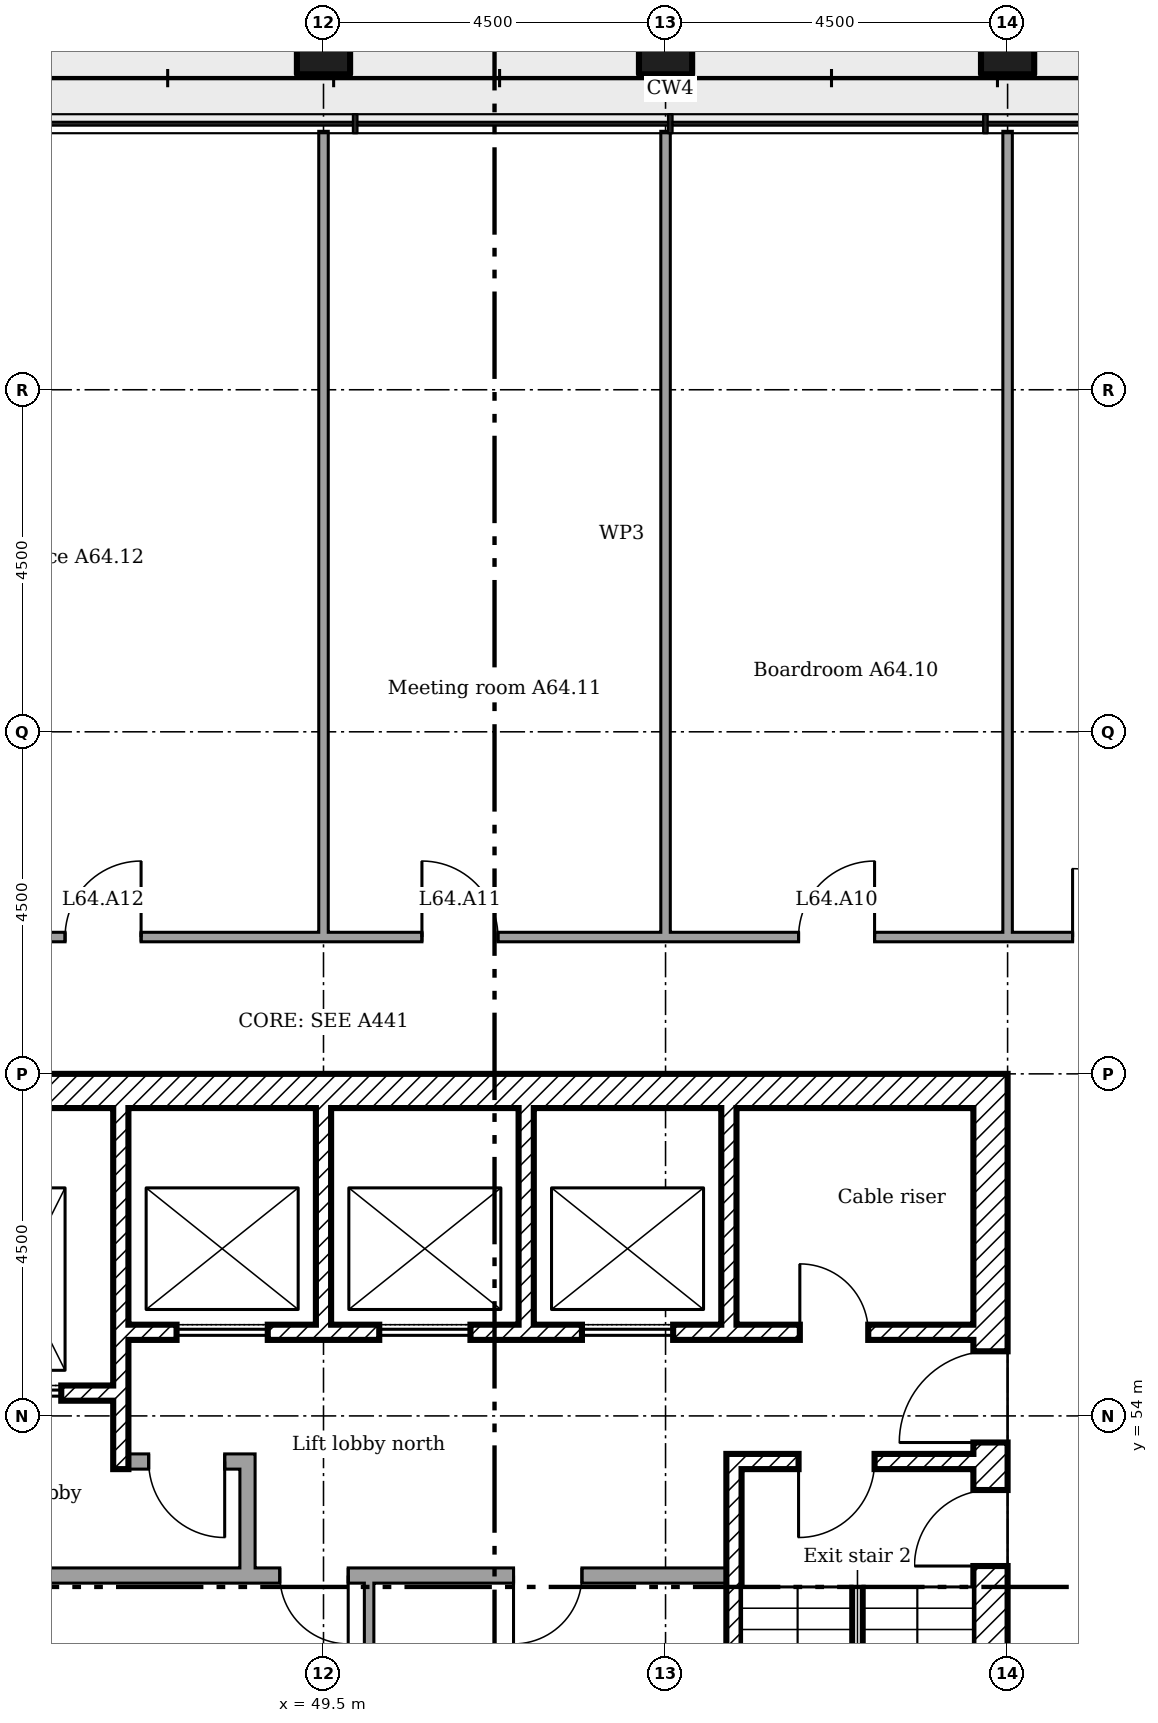
"""IFC4 building model, lengths in metres.
Left out: names, types, materials, properties, quantities, classifications, styles, units other than length and angle.
Written with IfcOpenShell. Run it as: python <this file> out.ifc"""

import sys

from ifc_helpers import new_model, si_unit, direction, frame, frame_2d, origin, origin_2d, place, context, subcontext, project, spatial, rectangle, extrude, element, fill, save


model = new_model("IFC4")
c1 = context("Model", 3, precision=1e-05, world=origin(), true_north=direction((0.0, 1.0)))
c2 = subcontext(c1, "Body", "Model", "MODEL_VIEW")
j1 = project(units=[si_unit("LENGTHUNIT", "METRE"), si_unit("PLANEANGLEUNIT", "RADIAN")], contexts=[c1])
p1 = place(None, origin())
s1 = spatial("IfcSite", under=j1, at=p1, CompositionType="ELEMENT")
p2 = place(p1, origin())
s2 = spatial("IfcBuilding", under=s1, at=p2, CompositionType="ELEMENT")
p3 = place(p2, frame((0.0, 0.0, 251.0)))
s3 = spatial("IfcBuildingStorey", under=s2, at=p3, CompositionType="ELEMENT", Elevation=251.0)
for number, where in (
    (1, (58.5, 72.0, 0.0)),
    (2, (54.0, 72.0, 0.0)),
    (3, (49.5, 72.0, 0.0)),
):
    element("IfcColumn", number, at=place(p3, frame(where)), inside=s3, PredefinedType="COLUMN", context=c2, shape_type="SweptSolid", body=[
        extrude(rectangle(XDim=0.7, YDim=0.7, at=origin_2d()), origin(), (0.0, 0.0, 1.0), 4.2),
    ])
p4 = place(p3, frame((58.275, 40.5, 0.0), z_axis=(0.0, 0.0, 1.0), x_axis=(0.0, 1.0, 0.0)))
e4 = element("IfcWall", 4, at=p4, inside=s3, PredefinedType="SHEAR", context=c2, shape_type="SweptSolid", body=[
    extrude(rectangle(XDim=18.0, YDim=0.45, at=frame_2d((9.0, 0.0))), origin(), (0.0, 0.0, 1.0), 3.78),
])
p5 = place(p4, frame((13.15, 0.0, 0.0)))
e5 = element("IfcOpeningElement", 5, at=p5, cuts=e4, PredefinedType="OPENING", context=c2, shape_type="SweptSolid", body=[
    extrude(rectangle(XDim=1.2, YDim=2.1, at=frame_2d((0.6, 1.05))), frame((0.0, 0.235, 0.0), z_axis=(0.0, -1.0, 0.0), x_axis=(1.0, 0.0, 0.0)), (0.0, 0.0, 1.0), 0.47),
])
p6 = place(p4, frame((3.9, 0.0, 0.0)))
e6 = element("IfcOpeningElement", 6, at=p6, cuts=e4, PredefinedType="OPENING", context=c2, shape_type="SweptSolid", body=[
    extrude(rectangle(XDim=1.8, YDim=2.1, at=frame_2d((0.9, 1.05))), frame((0.0, 0.235, 0.0), z_axis=(0.0, -1.0, 0.0), x_axis=(1.0, 0.0, 0.0)), (0.0, 0.0, 1.0), 0.47),
])
p7 = place(p4, frame((11.525, 0.0, 0.0)))
e7 = element("IfcOpeningElement", 7, at=p7, cuts=e4, PredefinedType="OPENING", context=c2, shape_type="SweptSolid", body=[
    extrude(rectangle(XDim=1.0, YDim=2.1, at=frame_2d((0.5, 1.05))), frame((0.0, 0.235, 0.0), z_axis=(0.0, -1.0, 0.0), x_axis=(1.0, 0.0, 0.0)), (0.0, 0.0, 1.0), 0.47),
])
p8 = place(p3, frame((40.5, 58.275, 0.0)))
e8 = element("IfcWall", 8, at=p8, inside=s3, PredefinedType="SHEAR", context=c2, shape_type="SweptSolid", body=[
    extrude(rectangle(XDim=17.55, YDim=0.45, at=frame_2d((8.775, 0.0))), origin(), (0.0, 0.0, 1.0), 3.78),
])
p9 = place(p3, frame((46.833, 58.05, 0.0), z_axis=(0.0, 0.0, 1.0), x_axis=(0.0, -1.0, 0.0)))
e9 = element("IfcWall", 9, at=p9, inside=s3, PredefinedType="SHEAR", context=c2, shape_type="SweptSolid", body=[
    extrude(rectangle(XDim=4.75, YDim=0.2, at=frame_2d((2.375, 0.0))), origin(), (0.0, 0.0, 1.0), 3.78),
])
for number, where, z_axis, x_axis in (
    (10, (49.5, 58.05, 0.0), (0.0, 0.0, 1.0), (0.0, -1.0, 0.0)),
    (11, (52.167, 58.05, 0.0), (0.0, 0.0, 1.0), (0.0, -1.0, 0.0)),
    (12, (54.833, 58.05, 0.0), (0.0, 0.0, 1.0), (0.0, -1.0, 0.0)),
):
    element("IfcWall", number, at=place(p3, frame(where, z_axis=z_axis, x_axis=x_axis)), inside=s3, PredefinedType="SHEAR", context=c2, shape_type="SweptSolid", body=[
        extrude(rectangle(XDim=2.85, YDim=0.2, at=frame_2d((1.425, 0.0))), origin(), (0.0, 0.0, 1.0), 3.78),
    ])
p10 = place(p3, frame((48.5, 51.9, 0.0), z_axis=(0.0, 0.0, 1.0), x_axis=(0.0, 1.0, 0.0)))
e13 = element("IfcWall", 13, at=p10, inside=s3, PredefinedType="PARTITIONING", context=c2, shape_type="SweptSolid", body=[
    extrude(rectangle(XDim=1.6, YDim=0.2, at=frame_2d((0.8, 0.0))), origin(), (0.0, 0.0, 1.0), 3.78),
])
p11 = place(p3, frame((46.933, 53.4, 0.0)))
e14 = element("IfcWall", 14, at=p11, inside=s3, PredefinedType="PARTITIONING", context=c2, shape_type="SweptSolid", body=[
    extrude(rectangle(XDim=1.467, YDim=0.2, at=frame_2d((0.733, 0.0))), origin(), (0.0, 0.0, 1.0), 3.78),
])
p12 = place(p11, frame((0.267, 0.0, 0.0)))
e15 = element("IfcOpeningElement", 15, at=p12, cuts=e14, PredefinedType="OPENING", context=c2, shape_type="SweptSolid", body=[
    extrude(rectangle(XDim=1.0, YDim=2.1, at=frame_2d((0.5, 1.05))), frame((0.0, 0.11, 0.0), z_axis=(0.0, -1.0, 0.0), x_axis=(1.0, 0.0, 0.0)), (0.0, 0.0, 1.0), 0.22),
])
p13 = place(p3, frame((46.933, 55.1, 0.0)))
e16 = element("IfcWall", 16, at=p13, inside=s3, PredefinedType="SHEAR", context=c2, shape_type="SweptSolid", body=[
    extrude(rectangle(XDim=11.117, YDim=0.2, at=frame_2d((5.558, 0.0))), origin(), (0.0, 0.0, 1.0), 3.78),
])
p14 = place(p13, frame((8.833, 0.0, 0.0)))
e17 = element("IfcOpeningElement", 17, at=p14, cuts=e16, PredefinedType="OPENING", context=c2, shape_type="SweptSolid", body=[
    extrude(rectangle(XDim=0.9, YDim=2.1, at=frame_2d((0.45, 1.05))), frame((0.0, 0.11, 0.0), z_axis=(0.0, -1.0, 0.0), x_axis=(1.0, 0.0, 0.0)), (0.0, 0.0, 1.0), 0.22),
])
p15 = place(p13, frame((0.633, 0.0, 0.0)))
e18 = element("IfcOpeningElement", 18, at=p15, cuts=e16, PredefinedType="OPENING", context=c2, shape_type="SweptSolid", body=[
    extrude(rectangle(XDim=1.2, YDim=2.1, at=frame_2d((0.6, 1.05))), frame((0.0, 0.11, 0.0), z_axis=(0.0, -1.0, 0.0), x_axis=(1.0, 0.0, 0.0)), (0.0, 0.0, 1.0), 0.22),
])
p16 = place(p13, frame((3.3, 0.0, 0.0)))
e19 = element("IfcOpeningElement", 19, at=p16, cuts=e16, PredefinedType="OPENING", context=c2, shape_type="SweptSolid", body=[
    extrude(rectangle(XDim=1.2, YDim=2.1, at=frame_2d((0.6, 1.05))), frame((0.0, 0.11, 0.0), z_axis=(0.0, -1.0, 0.0), x_axis=(1.0, 0.0, 0.0)), (0.0, 0.0, 1.0), 0.22),
])
p17 = place(p13, frame((5.967, 0.0, 0.0)))
e20 = element("IfcOpeningElement", 20, at=p17, cuts=e16, PredefinedType="OPENING", context=c2, shape_type="SweptSolid", body=[
    extrude(rectangle(XDim=1.2, YDim=2.1, at=frame_2d((0.6, 1.05))), frame((0.0, 0.11, 0.0), z_axis=(0.0, -1.0, 0.0), x_axis=(1.0, 0.0, 0.0)), (0.0, 0.0, 1.0), 0.22),
])
p18 = place(p3, frame((40.95, 54.3, 0.0)))
e21 = element("IfcWall", 21, at=p18, inside=s3, PredefinedType="SHEAR", context=c2, shape_type="SweptSolid", body=[
    extrude(rectangle(XDim=5.783, YDim=0.2, at=frame_2d((2.892, 0.0))), origin(), (0.0, 0.0, 1.0), 3.78),
])
p19 = place(p18, frame((1.333, 0.0, 0.0)))
e22 = element("IfcOpeningElement", 22, at=p19, cuts=e21, PredefinedType="OPENING", context=c2, shape_type="SweptSolid", body=[
    extrude(rectangle(XDim=1.1, YDim=2.1, at=frame_2d((0.55, 1.05))), frame((0.0, 0.11, 0.0), z_axis=(0.0, -1.0, 0.0), x_axis=(1.0, 0.0, 0.0)), (0.0, 0.0, 1.0), 0.22),
])
p20 = place(p18, frame((4.0, 0.0, 0.0)))
e23 = element("IfcOpeningElement", 23, at=p20, cuts=e21, PredefinedType="OPENING", context=c2, shape_type="SweptSolid", body=[
    extrude(rectangle(XDim=1.1, YDim=2.1, at=frame_2d((0.55, 1.05))), frame((0.0, 0.11, 0.0), z_axis=(0.0, -1.0, 0.0), x_axis=(1.0, 0.0, 0.0)), (0.0, 0.0, 1.0), 0.22),
])
p21 = place(p3, frame((54.8, 53.4, 0.0)))
e24 = element("IfcWall", 24, at=p21, inside=s3, PredefinedType="SHEAR", context=c2, shape_type="SweptSolid", body=[
    extrude(rectangle(XDim=3.25, YDim=0.2, at=frame_2d((1.625, 0.0))), origin(), (0.0, 0.0, 1.0), 3.78),
])
p22 = place(p21, frame((0.95, 0.0, 0.0)))
e25 = element("IfcOpeningElement", 25, at=p22, cuts=e24, PredefinedType="OPENING", context=c2, shape_type="SweptSolid", body=[
    extrude(rectangle(XDim=1.0, YDim=2.1, at=frame_2d((0.5, 1.05))), frame((0.0, 0.11, 0.0), z_axis=(0.0, -1.0, 0.0), x_axis=(1.0, 0.0, 0.0)), (0.0, 0.0, 1.0), 0.22),
])
p23 = place(p3, frame((54.9, 46.8, 0.0), z_axis=(0.0, 0.0, 1.0), x_axis=(0.0, 1.0, 0.0)))
e26 = element("IfcWall", 26, at=p23, inside=s3, PredefinedType="SHEAR", context=c2, shape_type="SweptSolid", body=[
    extrude(rectangle(XDim=6.5, YDim=0.2, at=frame_2d((3.25, 0.0))), origin(), (0.0, 0.0, 1.0), 3.78),
])
p24 = place(p3, frame((44.2, 51.9, 0.0)))
e27 = element("IfcWall", 27, at=p24, inside=s3, PredefinedType="PARTITIONING", context=c2, shape_type="SweptSolid", body=[
    extrude(rectangle(XDim=10.6, YDim=0.2, at=frame_2d((5.3, 0.0))), origin(), (0.0, 0.0, 1.0), 3.78),
])
p25 = place(p24, frame((4.725, 0.0, 0.0)))
e28 = element("IfcOpeningElement", 28, at=p25, cuts=e27, PredefinedType="OPENING", context=c2, shape_type="SweptSolid", body=[
    extrude(rectangle(XDim=0.9, YDim=2.1, at=frame_2d((0.45, 1.05))), frame((0.0, 0.11, 0.0), z_axis=(0.0, -1.0, 0.0), x_axis=(1.0, 0.0, 0.0)), (0.0, 0.0, 1.0), 0.22),
])
p26 = place(p24, frame((7.8, 0.0, 0.0)))
e29 = element("IfcOpeningElement", 29, at=p26, cuts=e27, PredefinedType="OPENING", context=c2, shape_type="SweptSolid", body=[
    extrude(rectangle(XDim=0.9, YDim=2.1, at=frame_2d((0.45, 1.05))), frame((0.0, 0.11, 0.0), z_axis=(0.0, -1.0, 0.0), x_axis=(1.0, 0.0, 0.0)), (0.0, 0.0, 1.0), 0.22),
])
p27 = place(p3, frame((50.1, 49.9, 0.0), z_axis=(0.0, 0.0, 1.0), x_axis=(0.0, 1.0, 0.0)))
e30 = element("IfcWall", 30, at=p27, inside=s3, PredefinedType="PARTITIONING", context=c2, shape_type="SweptSolid", body=[
    extrude(rectangle(XDim=1.9, YDim=0.125, at=frame_2d((0.95, 0.0))), origin(), (0.0, 0.0, 1.0), 3.78),
])
p28 = place(p3, frame((41.6, 60.3, 0.0)))
e31 = element("IfcWall", 31, at=p28, inside=s3, PredefinedType="PARTITIONING", context=c2, shape_type="SweptSolid", body=[
    extrude(rectangle(XDim=20.262, YDim=0.125, at=frame_2d((10.131, 0.0))), origin(), (0.0, 0.0, 1.0), 4.025),
])
p29 = place(p28, frame((17.755, 0.0, 0.0)))
e32 = element("IfcOpeningElement", 32, at=p29, cuts=e31, PredefinedType="OPENING", context=c2, shape_type="SweptSolid", body=[
    extrude(rectangle(XDim=1.8, YDim=2.1, at=frame_2d((0.9, 1.05))), frame((0.0, 0.073, 0.0), z_axis=(0.0, -1.0, 0.0), x_axis=(1.0, 0.0, 0.0)), (0.0, 0.0, 1.0), 0.145),
])
p30 = place(p28, frame((14.15, 0.0, 0.0)))
e33 = element("IfcOpeningElement", 33, at=p30, cuts=e31, PredefinedType="OPENING", context=c2, shape_type="SweptSolid", body=[
    extrude(rectangle(XDim=1.0, YDim=2.1, at=frame_2d((0.5, 1.05))), frame((0.0, 0.073, 0.0), z_axis=(0.0, -1.0, 0.0), x_axis=(1.0, 0.0, 0.0)), (0.0, 0.0, 1.0), 0.145),
])
p31 = place(p28, frame((9.195, 0.0, 0.0)))
e34 = element("IfcOpeningElement", 34, at=p31, cuts=e31, PredefinedType="OPENING", context=c2, shape_type="SweptSolid", body=[
    extrude(rectangle(XDim=1.0, YDim=2.1, at=frame_2d((0.5, 1.05))), frame((0.0, 0.073, 0.0), z_axis=(0.0, -1.0, 0.0), x_axis=(1.0, 0.0, 0.0)), (0.0, 0.0, 1.0), 0.145),
])
p32 = place(p28, frame((4.5, 0.0, 0.0)))
e35 = element("IfcOpeningElement", 35, at=p32, cuts=e31, PredefinedType="OPENING", context=c2, shape_type="SweptSolid", body=[
    extrude(rectangle(XDim=1.0, YDim=2.1, at=frame_2d((0.5, 1.05))), frame((0.0, 0.073, 0.0), z_axis=(0.0, -1.0, 0.0), x_axis=(1.0, 0.0, 0.0)), (0.0, 0.0, 1.0), 0.145),
])
p33 = place(p3, frame((49.5, 60.3, 0.0), z_axis=(0.0, 0.0, 1.0), x_axis=(0.0, 1.0, 0.0)))
e36 = element("IfcWall", 36, at=p33, inside=s3, PredefinedType="PARTITIONING", context=c2, shape_type="SweptSolid", body=[
    extrude(rectangle(XDim=10.6, YDim=0.125, at=frame_2d((5.3, 0.0))), origin(), (0.0, 0.0, 1.0), 3.341),
])
p34 = place(p3, frame((54.0, 60.3, 0.0), z_axis=(0.0, 0.0, 1.0), x_axis=(0.0, 1.0, 0.0)))
e37 = element("IfcWall", 37, at=p34, inside=s3, PredefinedType="MOVABLE", context=c2, shape_type="SweptSolid", body=[
    extrude(rectangle(XDim=10.6, YDim=0.125, at=frame_2d((5.3, 0.0))), origin(), (0.0, 0.0, 1.0), 3.341),
])
p35 = place(p3, frame((58.5, 60.3, 0.0), z_axis=(0.0, 0.0, 1.0), x_axis=(0.0, 1.0, 0.0)))
e38 = element("IfcWall", 38, at=p35, inside=s3, PredefinedType="PARTITIONING", context=c2, shape_type="SweptSolid", body=[
    extrude(rectangle(XDim=10.6, YDim=0.125, at=frame_2d((5.3, 0.0))), origin(), (0.0, 0.0, 1.0), 3.341),
])
p36 = place(p5, origin())
e39 = element("IfcDoor", 39, at=p36, inside=s3, OperationType="SINGLE_SWING_RIGHT", PredefinedType="DOOR", context=c2, shape_type="SweptSolid", body=[
    extrude(rectangle(XDim=1.2, YDim=2.1, at=frame_2d((0.6, 1.05))), frame((0.0, 0.025, 0.0), z_axis=(0.0, -1.0, 0.0), x_axis=(1.0, 0.0, 0.0)), (0.0, 0.0, 1.0), 0.05),
])
fill(e5, e39)
p37 = place(p22, frame((1.0, 0.0, 0.0), x_axis=(-1.0, 0.0, 0.0)))
e40 = element("IfcDoor", 40, at=p37, inside=s3, OperationType="SINGLE_SWING_LEFT", PredefinedType="DOOR", context=c2, shape_type="SweptSolid", body=[
    extrude(rectangle(XDim=1.0, YDim=2.1, at=frame_2d((0.5, 1.05))), frame((0.0, 0.025, 0.0), z_axis=(0.0, -1.0, 0.0), x_axis=(1.0, 0.0, 0.0)), (0.0, 0.0, 1.0), 0.05),
])
fill(e25, e40)
p38 = place(p7, origin())
e41 = element("IfcDoor", 41, at=p38, inside=s3, OperationType="SINGLE_SWING_RIGHT", PredefinedType="DOOR", context=c2, shape_type="SweptSolid", body=[
    extrude(rectangle(XDim=1.0, YDim=2.1, at=frame_2d((0.5, 1.05))), frame((0.0, 0.025, 0.0), z_axis=(0.0, -1.0, 0.0), x_axis=(1.0, 0.0, 0.0)), (0.0, 0.0, 1.0), 0.05),
])
fill(e7, e41)
p39 = place(p12, frame((1.0, 0.0, 0.0), x_axis=(-1.0, 0.0, 0.0)))
e42 = element("IfcDoor", 42, at=p39, inside=s3, OperationType="SINGLE_SWING_RIGHT", PredefinedType="DOOR", context=c2, shape_type="SweptSolid", body=[
    extrude(rectangle(XDim=1.0, YDim=2.1, at=frame_2d((0.5, 1.05))), frame((0.0, 0.025, 0.0), z_axis=(0.0, -1.0, 0.0), x_axis=(1.0, 0.0, 0.0)), (0.0, 0.0, 1.0), 0.05),
])
fill(e15, e42)
p40 = place(p14, origin())
e43 = element("IfcDoor", 43, at=p40, inside=s3, OperationType="SINGLE_SWING_RIGHT", PredefinedType="DOOR", context=c2, shape_type="SweptSolid", body=[
    extrude(rectangle(XDim=0.9, YDim=2.1, at=frame_2d((0.45, 1.05))), frame((0.0, 0.025, 0.0), z_axis=(0.0, -1.0, 0.0), x_axis=(1.0, 0.0, 0.0)), (0.0, 0.0, 1.0), 0.05),
])
fill(e17, e43)
p41 = place(p25, frame((0.9, 0.0, 0.0), x_axis=(-1.0, 0.0, 0.0)))
e44 = element("IfcDoor", 44, at=p41, inside=s3, OperationType="SINGLE_SWING_RIGHT", PredefinedType="DOOR", context=c2, shape_type="SweptSolid", body=[
    extrude(rectangle(XDim=0.9, YDim=2.1, at=frame_2d((0.45, 1.05))), frame((0.0, 0.025, 0.0), z_axis=(0.0, -1.0, 0.0), x_axis=(1.0, 0.0, 0.0)), (0.0, 0.0, 1.0), 0.05),
])
fill(e28, e44)
p42 = place(p26, frame((0.9, 0.0, 0.0), x_axis=(-1.0, 0.0, 0.0)))
e45 = element("IfcDoor", 45, at=p42, inside=s3, OperationType="SINGLE_SWING_LEFT", PredefinedType="DOOR", context=c2, shape_type="SweptSolid", body=[
    extrude(rectangle(XDim=0.9, YDim=2.1, at=frame_2d((0.45, 1.05))), frame((0.0, 0.025, 0.0), z_axis=(0.0, -1.0, 0.0), x_axis=(1.0, 0.0, 0.0)), (0.0, 0.0, 1.0), 0.05),
])
fill(e29, e45)
p43 = place(p20, origin())
e46 = element("IfcDoor", 46, at=p43, inside=s3, OperationType="SLIDING_TO_LEFT", PredefinedType="DOOR", context=c2, shape_type="SweptSolid", body=[
    extrude(rectangle(XDim=1.1, YDim=2.1, at=frame_2d((0.55, 1.05))), frame((0.0, 0.025, 0.0), z_axis=(0.0, -1.0, 0.0), x_axis=(1.0, 0.0, 0.0)), (0.0, 0.0, 1.0), 0.05),
])
fill(e23, e46)
p44 = place(p15, origin())
e47 = element("IfcDoor", 47, at=p44, inside=s3, OperationType="SLIDING_TO_LEFT", PredefinedType="DOOR", context=c2, shape_type="SweptSolid", body=[
    extrude(rectangle(XDim=1.2, YDim=2.1, at=frame_2d((0.6, 1.05))), frame((0.0, 0.025, 0.0), z_axis=(0.0, -1.0, 0.0), x_axis=(1.0, 0.0, 0.0)), (0.0, 0.0, 1.0), 0.05),
])
fill(e18, e47)
p45 = place(p16, origin())
e48 = element("IfcDoor", 48, at=p45, inside=s3, OperationType="SLIDING_TO_LEFT", PredefinedType="DOOR", context=c2, shape_type="SweptSolid", body=[
    extrude(rectangle(XDim=1.2, YDim=2.1, at=frame_2d((0.6, 1.05))), frame((0.0, 0.025, 0.0), z_axis=(0.0, -1.0, 0.0), x_axis=(1.0, 0.0, 0.0)), (0.0, 0.0, 1.0), 0.05),
])
fill(e19, e48)
p46 = place(p17, origin())
e49 = element("IfcDoor", 49, at=p46, inside=s3, OperationType="SLIDING_TO_LEFT", PredefinedType="DOOR", context=c2, shape_type="SweptSolid", body=[
    extrude(rectangle(XDim=1.2, YDim=2.1, at=frame_2d((0.6, 1.05))), frame((0.0, 0.025, 0.0), z_axis=(0.0, -1.0, 0.0), x_axis=(1.0, 0.0, 0.0)), (0.0, 0.0, 1.0), 0.05),
])
fill(e20, e49)
p47 = place(p29, origin())
e50 = element("IfcDoor", 50, at=p47, inside=s3, OperationType="DOUBLE_DOOR_SINGLE_SWING", PredefinedType="DOOR", context=c2, shape_type="SweptSolid", body=[
    extrude(rectangle(XDim=1.8, YDim=2.1, at=frame_2d((0.9, 1.05))), frame((0.0, 0.025, 0.0), z_axis=(0.0, -1.0, 0.0), x_axis=(1.0, 0.0, 0.0)), (0.0, 0.0, 1.0), 0.05),
])
fill(e32, e50)
p48 = place(p30, origin())
e51 = element("IfcDoor", 51, at=p48, inside=s3, OperationType="SINGLE_SWING_LEFT", PredefinedType="DOOR", context=c2, shape_type="SweptSolid", body=[
    extrude(rectangle(XDim=1.0, YDim=2.1, at=frame_2d((0.5, 1.05))), frame((0.0, 0.025, 0.0), z_axis=(0.0, -1.0, 0.0), x_axis=(1.0, 0.0, 0.0)), (0.0, 0.0, 1.0), 0.05),
])
fill(e33, e51)
p49 = place(p31, origin())
e52 = element("IfcDoor", 52, at=p49, inside=s3, OperationType="SINGLE_SWING_RIGHT", PredefinedType="DOOR", context=c2, shape_type="SweptSolid", body=[
    extrude(rectangle(XDim=1.0, YDim=2.1, at=frame_2d((0.5, 1.05))), frame((0.0, 0.025, 0.0), z_axis=(0.0, -1.0, 0.0), x_axis=(1.0, 0.0, 0.0)), (0.0, 0.0, 1.0), 0.05),
])
fill(e34, e52)
p50 = place(p32, origin())
e53 = element("IfcDoor", 53, at=p50, inside=s3, OperationType="SINGLE_SWING_LEFT", PredefinedType="DOOR", context=c2, shape_type="SweptSolid", body=[
    extrude(rectangle(XDim=1.0, YDim=2.1, at=frame_2d((0.5, 1.05))), frame((0.0, 0.025, 0.0), z_axis=(0.0, -1.0, 0.0), x_axis=(1.0, 0.0, 0.0)), (0.0, 0.0, 1.0), 0.05),
])
fill(e35, e53)
save(model, sys.argv[1])
